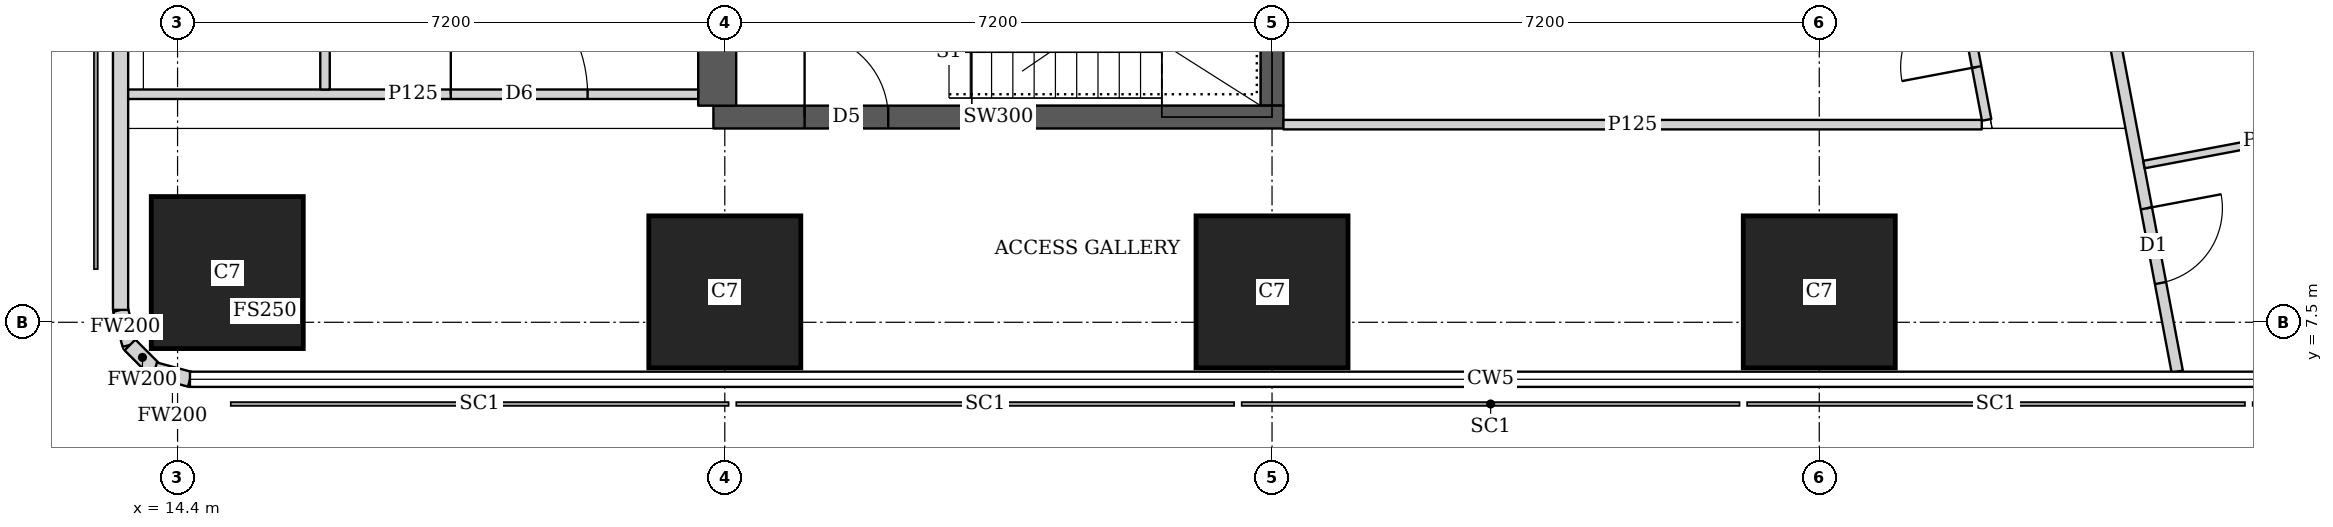
"""IFC4 building model, lengths in metres.
Left out: names, types, materials, properties, quantities, classifications, styles, units other than length and angle.
Written with IfcOpenShell. Run it as: python <this file> out.ifc"""

import sys

from ifc_helpers import new_model, si_unit, direction, frame, frame_2d, origin, origin_2d, place, context, subcontext, project, spatial, rectangle, extrude, element, fill, save


model = new_model("IFC4")
c1 = context("Model", 3, precision=1e-05, world=origin(), true_north=direction((0.0, 1.0)))
c2 = subcontext(c1, "Body", "Model", "MODEL_VIEW")
j1 = project(units=[si_unit("LENGTHUNIT", "METRE"), si_unit("PLANEANGLEUNIT", "RADIAN")], contexts=[c1])
p1 = place(None, origin())
s1 = spatial("IfcSite", under=j1, at=p1, CompositionType="ELEMENT")
p2 = place(p1, origin())
s2 = spatial("IfcBuilding", under=s1, at=p2, CompositionType="ELEMENT")
p3 = place(p2, frame((0.0, 0.0, 285.35)))
s3 = spatial("IfcBuildingStorey", under=s2, at=p3, CompositionType="ELEMENT", Elevation=285.35)
for number, where, z_axis, x_axis in (
    (1, (15.054, 8.154, 0.0), (0.0, 0.0, 1.0), (1.0, 0.0, 0.0)),
    (2, (21.6, 7.9, 0.0), (0.0, 0.0, 1.0), (1.0, 0.0, 0.0)),
    (3, (28.8, 7.9, 0.0), (0.0, 0.0, 1.0), (1.0, 0.0, 0.0)),
    (4, (36.0, 7.9, 0.0), (0.0, 0.0, 1.0), (1.0, 0.0, 0.0)),
):
    element("IfcColumn", number, at=place(p3, frame(where, z_axis=z_axis, x_axis=x_axis)), inside=s3, PredefinedType="COLUMN", context=c2, shape_type="SweptSolid", body=[
        extrude(rectangle(XDim=2.0, YDim=2.0, at=origin_2d()), origin(), (0.0, 0.0, 1.0), 3.75),
    ])
p4 = place(p3, frame((21.45, 10.2, 0.0), z_axis=(0.0, 0.0, 1.0), x_axis=(1.0, 0.0, 0.0)))
e5 = element("IfcWall", 5, at=p4, inside=s3, PredefinedType="SHEAR", context=c2, shape_type="SweptSolid", body=[
    extrude(rectangle(XDim=7.5, YDim=0.3, at=frame_2d((3.75, 0.0))), origin(), (0.0, 0.0, 1.0), 3.75),
])
p5 = place(p4, frame((1.2, 0.0, 0.0)))
e6 = element("IfcOpeningElement", 6, at=p5, cuts=e5, PredefinedType="OPENING", context=c2, shape_type="SweptSolid", body=[
    extrude(rectangle(XDim=1.1, YDim=2.1, at=frame_2d((0.55, 1.05))), frame((0.0, 0.16, 0.0), z_axis=(0.0, -1.0, 0.0), x_axis=(1.0, 0.0, 0.0)), (0.0, 0.0, 1.0), 0.32),
])
p6 = place(p3, frame((21.5, 10.35, 0.0), z_axis=(0.0, 0.0, 1.0), x_axis=(0.0, 1.0, 0.0)))
e7 = element("IfcWall", 7, at=p6, inside=s3, PredefinedType="SHEAR", context=c2, shape_type="SweptSolid", body=[
    extrude(rectangle(XDim=4.2, YDim=0.5, at=frame_2d((2.1, 0.0))), origin(), (0.0, 0.0, 1.0), 3.75),
])
p7 = place(p3, frame((28.8, 10.35, 0.0), z_axis=(0.0, 0.0, 1.0), x_axis=(0.0, 1.0, 0.0)))
e8 = element("IfcWall", 8, at=p7, inside=s3, PredefinedType="SHEAR", context=c2, shape_type="SweptSolid", body=[
    extrude(rectangle(XDim=4.2, YDim=0.3, at=frame_2d((2.1, 0.0))), origin(), (0.0, 0.0, 1.0), 3.75),
])
p8 = place(p3, frame((13.65, 43.037, 0.0), z_axis=(0.0, 0.0, 1.0), x_axis=(0.0, -1.0, 0.0)))
e9 = element("IfcWall", 9, at=p8, inside=s3, PredefinedType="SOLIDWALL", context=c2, shape_type="SweptSolid", body=[
    extrude(rectangle(XDim=35.374, YDim=0.2, at=frame_2d((17.687, 0.0))), origin(), (0.0, 0.0, 1.0), 3.5),
])
p9 = place(p3, frame((13.65, 7.663, 0.0), z_axis=(0.0, 0.0, 1.0), x_axis=(0.259698463175, -0.965689757751, 0.0)))
e10 = element("IfcWall", 10, at=p9, inside=s3, PredefinedType="SOLIDWALL", context=c2, shape_type="SweptSolid", body=[
    extrude(rectangle(XDim=0.478, YDim=0.2, at=frame_2d((0.239, 0.0))), origin(), (0.0, 0.0, 1.0), 3.5),
])
p10 = place(p3, frame((13.774, 7.202, 0.0), z_axis=(0.0, 0.0, 1.0), x_axis=(0.707369890659, -0.706843573776, 0.0)))
e11 = element("IfcWall", 11, at=p10, inside=s3, PredefinedType="SOLIDWALL", context=c2, shape_type="SweptSolid", body=[
    extrude(rectangle(XDim=0.464, YDim=0.2, at=frame_2d((0.232, 0.0))), origin(), (0.0, 0.0, 1.0), 3.5),
])
p11 = place(p3, frame((14.102, 6.874, 0.0), z_axis=(0.0, 0.0, 1.0), x_axis=(0.965655254015, -0.259826731483, 0.0)))
e12 = element("IfcWall", 12, at=p11, inside=s3, PredefinedType="SOLIDWALL", context=c2, shape_type="SweptSolid", body=[
    extrude(rectangle(XDim=0.477, YDim=0.2, at=frame_2d((0.239, 0.0))), origin(), (0.0, 0.0, 1.0), 3.5),
])
p12 = place(p3, frame((34.036, 42.186, 0.0), z_axis=(0.0, 0.0, 1.0), x_axis=(0.185593518645, -0.9826266055, 0.0)))
e13 = element("IfcWall", 13, at=p12, inside=s3, PredefinedType="SOLIDWALL", context=c2, shape_type="SweptSolid", body=[
    extrude(rectangle(XDim=35.961, YDim=0.15, at=frame_2d((17.98, 0.0))), origin(), (0.0, 0.0, 1.0), 2.5),
])
p13 = place(p12, frame((19.345, 0.0, 0.0)))
e14 = element("IfcOpeningElement", 14, at=p13, cuts=e13, PredefinedType="OPENING", context=c2, shape_type="SweptSolid", body=[
    extrude(rectangle(XDim=1.0, YDim=2.1, at=frame_2d((0.5, 1.05))), frame((0.0, 0.085, 0.0), z_axis=(0.0, -1.0, 0.0), x_axis=(1.0, 0.0, 0.0)), (0.0, 0.0, 1.0), 0.17),
])
p14 = place(p12, frame((33.774, 0.0, 0.0)))
e15 = element("IfcOpeningElement", 15, at=p14, cuts=e13, PredefinedType="OPENING", context=c2, shape_type="SweptSolid", body=[
    extrude(rectangle(XDim=1.0, YDim=2.1, at=frame_2d((0.5, 1.05))), frame((0.0, 0.085, 0.0), z_axis=(0.0, -1.0, 0.0), x_axis=(1.0, 0.0, 0.0)), (0.0, 0.0, 1.0), 0.17),
])
p15 = place(p3, frame((43.539, 10.192, 0.0), z_axis=(0.0, 0.0, 1.0), x_axis=(-0.982633623707, -0.185556356831, 0.0)))
e16 = element("IfcWall", 16, at=p15, inside=s3, PredefinedType="PARTITIONING", context=c2, shape_type="SweptSolid", body=[
    extrude(rectangle(XDim=3.325, YDim=0.1, at=frame_2d((1.663, 0.0))), origin(), (0.0, 0.0, 1.0), 3.5),
])
p16 = place(p3, frame((13.75, 10.5, 0.0), z_axis=(0.0, 0.0, 1.0), x_axis=(1.0, 0.0, 0.0)))
e17 = element("IfcWall", 17, at=p16, inside=s3, PredefinedType="PARTITIONING", context=c2, shape_type="SweptSolid", body=[
    extrude(rectangle(XDim=7.5, YDim=0.125, at=frame_2d((3.75, 0.0))), origin(), (0.0, 0.0, 1.0), 3.5),
])
p17 = place(p16, frame((4.245, 0.0, 0.0)))
e18 = element("IfcOpeningElement", 18, at=p17, cuts=e17, PredefinedType="OPENING", context=c2, shape_type="SweptSolid", body=[
    extrude(rectangle(XDim=1.8, YDim=2.1, at=frame_2d((0.9, 1.05))), frame((0.0, 0.073, 0.0), z_axis=(0.0, -1.0, 0.0), x_axis=(1.0, 0.0, 0.0)), (0.0, 0.0, 1.0), 0.145),
])
p18 = place(p3, frame((16.34, 10.562, 0.0), z_axis=(0.0, 0.0, 1.0), x_axis=(0.0, 1.0, 0.0)))
e19 = element("IfcWall", 19, at=p18, inside=s3, PredefinedType="PARTITIONING", context=c2, shape_type="SweptSolid", body=[
    extrude(rectangle(XDim=3.988, YDim=0.125, at=frame_2d((1.994, 0.0))), origin(), (0.0, 0.0, 1.0), 3.5),
])
p19 = place(p18, frame((1.438, 0.0, 0.0)))
e20 = element("IfcOpeningElement", 20, at=p19, cuts=e19, PredefinedType="OPENING", context=c2, shape_type="SweptSolid", body=[
    extrude(rectangle(XDim=1.0, YDim=2.1, at=frame_2d((0.5, 1.05))), frame((0.0, 0.073, 0.0), z_axis=(0.0, -1.0, 0.0), x_axis=(1.0, 0.0, 0.0)), (0.0, 0.0, 1.0), 0.145),
])
p20 = place(p3, frame((28.95, 10.1, 0.0), z_axis=(0.0, 0.0, 1.0), x_axis=(1.0, 0.0, 0.0)))
e21 = element("IfcWall", 21, at=p20, inside=s3, PredefinedType="PARTITIONING", context=c2, shape_type="SweptSolid", body=[
    extrude(rectangle(XDim=9.188, YDim=0.125, at=frame_2d((4.594, 0.0))), origin(), (0.0, 0.0, 1.0), 3.5),
])
p21 = place(p3, frame((38.202, 10.163, 0.0), z_axis=(0.0, 0.0, 1.0), x_axis=(-0.185641892853, 0.982617467593, 0.0)))
e22 = element("IfcWall", 22, at=p21, inside=s3, PredefinedType="PARTITIONING", context=c2, shape_type="SweptSolid", body=[
    extrude(rectangle(XDim=4.922, YDim=0.125, at=frame_2d((2.461, 0.0))), origin(), (0.0, 0.0, 1.0), 3.5),
])
p22 = place(p21, frame((0.708, 0.0, 0.0)))
e23 = element("IfcOpeningElement", 23, at=p22, cuts=e22, PredefinedType="OPENING", context=c2, shape_type="SweptSolid", body=[
    extrude(rectangle(XDim=1.0, YDim=2.1, at=frame_2d((0.5, 1.05))), frame((0.0, 0.073, 0.0), z_axis=(0.0, -1.0, 0.0), x_axis=(1.0, 0.0, 0.0)), (0.0, 0.0, 1.0), 0.145),
])
p23 = place(p14, origin())
e24 = element("IfcDoor", 24, at=p23, inside=s3, OperationType="SINGLE_SWING_LEFT", PredefinedType="DOOR", context=c2, shape_type="SweptSolid", body=[
    extrude(rectangle(XDim=1.0, YDim=2.1, at=frame_2d((0.5, 1.05))), frame((0.0, 0.025, 0.0), z_axis=(0.0, -1.0, 0.0), x_axis=(1.0, 0.0, 0.0)), (0.0, 0.0, 1.0), 0.05),
])
fill(e15, e24)
p24 = place(p17, origin())
e25 = element("IfcDoor", 25, at=p24, inside=s3, OperationType="DOUBLE_DOOR_SINGLE_SWING", PredefinedType="DOOR", context=c2, shape_type="SweptSolid", body=[
    extrude(rectangle(XDim=1.8, YDim=2.1, at=frame_2d((0.9, 1.05))), frame((0.0, 0.025, 0.0), z_axis=(0.0, -1.0, 0.0), x_axis=(1.0, 0.0, 0.0)), (0.0, 0.0, 1.0), 0.05),
])
fill(e18, e25)
p25 = place(p22, origin())
e26 = element("IfcDoor", 26, at=p25, inside=s3, OperationType="SINGLE_SWING_LEFT", PredefinedType="DOOR", context=c2, shape_type="SweptSolid", body=[
    extrude(rectangle(XDim=1.0, YDim=2.1, at=frame_2d((0.5, 1.05))), frame((0.0, 0.025, 0.0), z_axis=(0.0, -1.0, 0.0), x_axis=(1.0, 0.0, 0.0)), (0.0, 0.0, 1.0), 0.05),
])
fill(e23, e26)
p26 = place(p5, origin())
e27 = element("IfcDoor", 27, at=p26, inside=s3, OperationType="SINGLE_SWING_LEFT", PredefinedType="DOOR", context=c2, shape_type="SweptSolid", body=[
    extrude(rectangle(XDim=1.1, YDim=2.1, at=frame_2d((0.55, 1.05))), frame((0.0, 0.025, 0.0), z_axis=(0.0, -1.0, 0.0), x_axis=(1.0, 0.0, 0.0)), (0.0, 0.0, 1.0), 0.05),
])
fill(e6, e27)
save(model, sys.argv[1])
